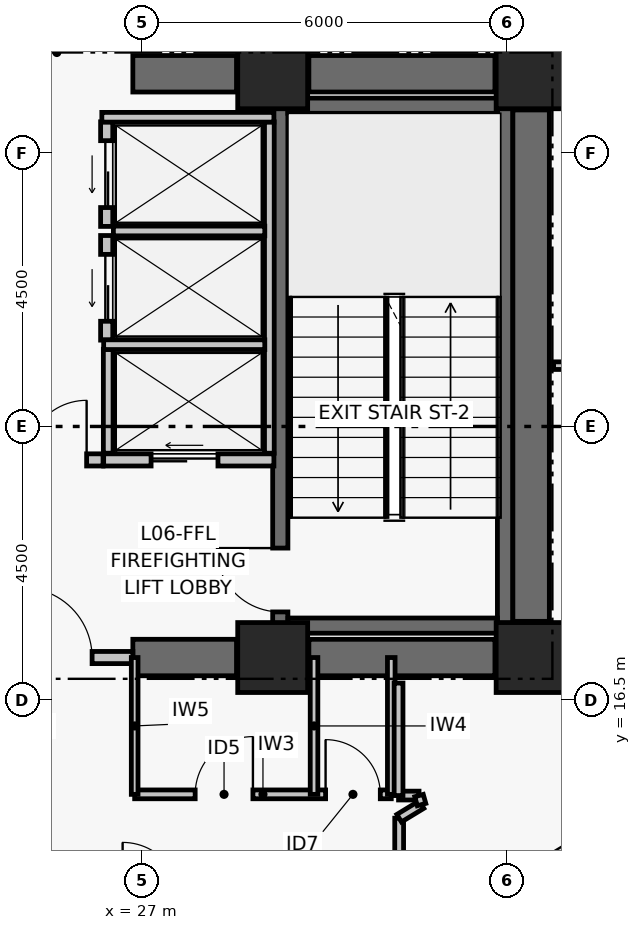
"""IFC4 building model, lengths in metres.
Left out: names, types, materials, properties, quantities, classifications, styles, units other than length and angle.
Written with IfcOpenShell. Run it as: python <this file> out.ifc"""

import sys

from ifc_helpers import new_model, si_unit, direction, frame, frame_2d, origin, origin_2d, place, context, subcontext, project, spatial, rectangle, extrude, element, fill, save


model = new_model("IFC4")
c1 = context("Model", 3, precision=1e-05, world=origin(), true_north=direction((0.0, 1.0)))
c2 = subcontext(c1, "Body", "Model", "MODEL_VIEW")
j1 = project(units=[si_unit("LENGTHUNIT", "METRE"), si_unit("PLANEANGLEUNIT", "RADIAN")], contexts=[c1])
p1 = place(None, origin())
s1 = spatial("IfcSite", under=j1, at=p1, CompositionType="ELEMENT")
p2 = place(p1, origin())
s2 = spatial("IfcBuilding", under=s1, at=p2, CompositionType="ELEMENT")
p3 = place(p2, frame((0.0, 0.0, 31.32)))
s3 = spatial("IfcBuildingStorey", under=s2, at=p3, CompositionType="ELEMENT", Elevation=31.32)
for number, where, z_axis, x_axis in (
    (1, (29.15, 17.2, 0.0), (0.0, 0.0, 1.0), (1.0, 0.0, 0.0)),
    (2, (33.4, 17.2, 0.0), (0.0, 0.0, 1.0), (1.0, 0.0, 0.0)),
    (3, (29.15, 26.8, 0.0), (0.0, 0.0, 1.0), (1.0, 0.0, 0.0)),
    (4, (33.4, 26.8, 0.0), (0.0, 0.0, 1.0), (1.0, 0.0, 0.0)),
):
    element("IfcColumn", number, at=place(p3, frame(where, z_axis=z_axis, x_axis=x_axis)), inside=s3, PredefinedType="COLUMN", context=c2, shape_type="SweptSolid", body=[
        extrude(rectangle(XDim=1.15, YDim=1.15, at=origin_2d()), origin(), (0.0, 0.0, 1.0), 3.72),
    ])
p4 = place(p3, frame((26.85, 17.2, 0.0), z_axis=(0.0, 0.0, 1.0), x_axis=(1.0, 0.0, 0.0)))
e5 = element("IfcWall", 5, at=p4, inside=s3, PredefinedType="SHEAR", context=c2, shape_type="SweptSolid", body=[
    extrude(rectangle(XDim=1.705, YDim=0.6, at=frame_2d((0.853, 0.0))), origin(), (0.0, 0.0, 1.0), 3.47),
])
p5 = place(p3, frame((29.745, 17.2, 0.0), z_axis=(0.0, 0.0, 1.0), x_axis=(1.0, 0.0, 0.0)))
e6 = element("IfcWall", 6, at=p5, inside=s3, PredefinedType="SHEAR", context=c2, shape_type="SweptSolid", body=[
    extrude(rectangle(XDim=3.06, YDim=0.6, at=frame_2d((1.53, 0.0))), origin(), (0.0, 0.0, 1.0), 3.47),
])
p6 = place(p3, frame((26.85, 26.8, 0.0), z_axis=(0.0, 0.0, 1.0), x_axis=(1.0, 0.0, 0.0)))
e7 = element("IfcWall", 7, at=p6, inside=s3, PredefinedType="SHEAR", context=c2, shape_type="SweptSolid", body=[
    extrude(rectangle(XDim=1.705, YDim=0.6, at=frame_2d((0.853, 0.0))), origin(), (0.0, 0.0, 1.0), 3.47),
])
p7 = place(p3, frame((29.745, 26.8, 0.0), z_axis=(0.0, 0.0, 1.0), x_axis=(1.0, 0.0, 0.0)))
e8 = element("IfcWall", 8, at=p7, inside=s3, PredefinedType="SHEAR", context=c2, shape_type="SweptSolid", body=[
    extrude(rectangle(XDim=3.06, YDim=0.6, at=frame_2d((1.53, 0.0))), origin(), (0.0, 0.0, 1.0), 3.47),
])
p8 = place(p3, frame((33.4, 17.795, 0.0), z_axis=(0.0, 0.0, 1.0), x_axis=(0.0, 1.0, 0.0)))
e9 = element("IfcWall", 9, at=p8, inside=s3, PredefinedType="SHEAR", context=c2, shape_type="SweptSolid", body=[
    extrude(rectangle(XDim=8.41, YDim=0.6, at=frame_2d((4.205, 0.0))), origin(), (0.0, 0.0, 1.0), 3.47),
])
p9 = place(p3, frame((29.275, 17.6, 0.0), z_axis=(0.0, 0.0, 1.0), x_axis=(0.0, 1.0, 0.0)))
e10 = element("IfcWall", 10, at=p9, inside=s3, PredefinedType="SHEAR", context=c2, shape_type="SweptSolid", body=[
    extrude(rectangle(XDim=8.8, YDim=0.25, at=frame_2d((4.4, 0.0))), origin(), (0.0, 0.0, 1.0), 3.47),
])
p10 = place(p9, frame((0.35, 0.0, 0.0)))
e11 = element("IfcOpeningElement", 11, at=p10, cuts=e10, PredefinedType="OPENING", context=c2, shape_type="SweptSolid", body=[
    extrude(rectangle(XDim=1.05, YDim=2.08, at=frame_2d((0.525, 1.04))), frame((0.0, 0.135, 0.0), z_axis=(0.0, -1.0, 0.0), x_axis=(1.0, 0.0, 0.0)), (0.0, 0.0, 1.0), 0.27),
])
p11 = place(p3, frame((32.971, 17.6, 0.0), z_axis=(0.0, 0.0, 1.0), x_axis=(0.0, 1.0, 0.0)))
e12 = element("IfcWall", 12, at=p11, inside=s3, PredefinedType="SHEAR", context=c2, shape_type="SweptSolid", body=[
    extrude(rectangle(XDim=8.8, YDim=0.25, at=frame_2d((4.4, 0.0))), origin(), (0.0, 0.0, 1.0), 3.47),
])
for number, where, z_axis, x_axis in (
    (13, (29.4, 17.725, 0.0), (0.0, 0.0, 1.0), (1.0, 0.0, 0.0)),
    (14, (29.4, 26.275, 0.0), (0.0, 0.0, 1.0), (1.0, 0.0, 0.0)),
):
    element("IfcWall", number, at=place(p3, frame(where, z_axis=z_axis, x_axis=x_axis)), inside=s3, PredefinedType="SHEAR", context=c2, shape_type="SweptSolid", body=[
        extrude(rectangle(XDim=3.446, YDim=0.25, at=frame_2d((1.723, 0.0))), origin(), (0.0, 0.0, 1.0), 3.47),
    ])
p12 = place(p3, frame((24.35, 17.2, 0.0), z_axis=(0.0, 0.0, 1.0), x_axis=(1.0, 0.0, 0.0)))
e15 = element("IfcWall", 15, at=p12, inside=s3, PredefinedType="PARTITIONING", context=c2, shape_type="SweptSolid", body=[
    extrude(rectangle(XDim=2.5, YDim=0.2, at=frame_2d((1.25, 0.0))), origin(), (0.0, 0.0, 1.0), 2.6),
])
p13 = place(p12, frame((0.68, 0.0, 0.0)))
e16 = element("IfcOpeningElement", 16, at=p13, cuts=e15, PredefinedType="OPENING", context=c2, shape_type="SweptSolid", body=[
    extrude(rectangle(XDim=1.15, YDim=2.08, at=frame_2d((0.575, 1.04))), frame((0.0, 0.11, 0.0), z_axis=(0.0, -1.0, 0.0), x_axis=(1.0, 0.0, 0.0)), (0.0, 0.0, 1.0), 0.22),
])
p14 = place(p3, frame((24.84, 20.45, 0.0), z_axis=(0.0, 0.0, 1.0), x_axis=(1.0, 0.0, 0.0)))
e17 = element("IfcWall", 17, at=p14, inside=s3, PredefinedType="PARTITIONING", context=c2, shape_type="SweptSolid", body=[
    extrude(rectangle(XDim=1.52, YDim=0.2, at=frame_2d((0.76, 0.0))), origin(), (0.0, 0.0, 1.0), 3.47),
])
p15 = place(p14, frame((0.27, 0.0, 0.0)))
e18 = element("IfcOpeningElement", 18, at=p15, cuts=e17, PredefinedType="OPENING", context=c2, shape_type="SweptSolid", body=[
    extrude(rectangle(XDim=0.98, YDim=2.06, at=frame_2d((0.49, 1.03))), frame((0.0, 0.11, 0.0), z_axis=(0.0, -1.0, 0.0), x_axis=(1.0, 0.0, 0.0)), (0.0, 0.0, 1.0), 0.22),
])
p16 = place(p3, frame((26.37, 20.45, 0.0), z_axis=(0.0, 0.0, 1.0), x_axis=(1.0, 0.0, 0.0)))
e19 = element("IfcWall", 19, at=p16, inside=s3, PredefinedType="PARTITIONING", context=c2, shape_type="SweptSolid", body=[
    extrude(rectangle(XDim=2.8, YDim=0.2, at=frame_2d((1.4, 0.0))), origin(), (0.0, 0.0, 1.0), 3.47),
])
p17 = place(p16, frame((0.78, 0.0, 0.0)))
e20 = element("IfcOpeningElement", 20, at=p17, cuts=e19, PredefinedType="OPENING", context=c2, shape_type="SweptSolid", body=[
    extrude(rectangle(XDim=1.1, YDim=2.08, at=frame_2d((0.55, 1.04))), frame((0.0, 0.11, 0.0), z_axis=(0.0, -1.0, 0.0), x_axis=(1.0, 0.0, 0.0)), (0.0, 0.0, 1.0), 0.22),
])
p18 = place(p3, frame((26.42, 22.42, 0.0), z_axis=(0.0, 0.0, 1.0), x_axis=(0.0, 1.0, 0.0)))
e21 = element("IfcWall", 21, at=p18, inside=s3, PredefinedType="PARTITIONING", context=c2, shape_type="SweptSolid", body=[
    extrude(rectangle(XDim=1.72, YDim=0.2, at=frame_2d((0.86, 0.0))), origin(), (0.0, 0.0, 1.0), 3.47),
])
p19 = place(p18, frame((0.31, 0.0, 0.0)))
e22 = element("IfcOpeningElement", 22, at=p19, cuts=e21, PredefinedType="OPENING", context=c2, shape_type="SweptSolid", body=[
    extrude(rectangle(XDim=1.1, YDim=2.08, at=frame_2d((0.55, 1.04))), frame((0.0, 0.11, 0.0), z_axis=(0.0, -1.0, 0.0), x_axis=(1.0, 0.0, 0.0)), (0.0, 0.0, 1.0), 0.22),
])
p20 = place(p3, frame((26.42, 24.29, 0.0), z_axis=(0.0, 0.0, 1.0), x_axis=(0.0, 1.0, 0.0)))
e23 = element("IfcWall", 23, at=p20, inside=s3, PredefinedType="PARTITIONING", context=c2, shape_type="SweptSolid", body=[
    extrude(rectangle(XDim=1.72, YDim=0.2, at=frame_2d((0.86, 0.0))), origin(), (0.0, 0.0, 1.0), 3.47),
])
p21 = place(p20, frame((0.31, 0.0, 0.0)))
e24 = element("IfcOpeningElement", 24, at=p21, cuts=e23, PredefinedType="OPENING", context=c2, shape_type="SweptSolid", body=[
    extrude(rectangle(XDim=1.1, YDim=2.08, at=frame_2d((0.55, 1.04))), frame((0.0, 0.11, 0.0), z_axis=(0.0, -1.0, 0.0), x_axis=(1.0, 0.0, 0.0)), (0.0, 0.0, 1.0), 0.22),
])
p22 = place(p3, frame((29.095, 20.56, 0.0), z_axis=(0.0, 0.0, 1.0), x_axis=(0.0, 1.0, 0.0)))
e25 = element("IfcWall", 25, at=p22, inside=s3, PredefinedType="PARTITIONING", context=c2, shape_type="SweptSolid", body=[
    extrude(rectangle(XDim=5.45, YDim=0.16, at=frame_2d((2.725, 0.0))), origin(), (0.0, 0.0, 1.0), 3.47),
])
p23 = place(p3, frame((26.445, 20.56, 0.0), z_axis=(0.0, 0.0, 1.0), x_axis=(0.0, 1.0, 0.0)))
e26 = element("IfcWall", 26, at=p23, inside=s3, PredefinedType="PARTITIONING", context=c2, shape_type="SweptSolid", body=[
    extrude(rectangle(XDim=1.71, YDim=0.16, at=frame_2d((0.855, 0.0))), origin(), (0.0, 0.0, 1.0), 3.47),
])
p24 = place(p3, frame((26.37, 22.345, 0.0), z_axis=(0.0, 0.0, 1.0), x_axis=(1.0, 0.0, 0.0)))
e27 = element("IfcWall", 27, at=p24, inside=s3, PredefinedType="PARTITIONING", context=c2, shape_type="SweptSolid", body=[
    extrude(rectangle(XDim=2.65, YDim=0.16, at=frame_2d((1.325, 0.0))), origin(), (0.0, 0.0, 1.0), 3.47),
])
p25 = place(p3, frame((26.53, 24.215, 0.0), z_axis=(0.0, 0.0, 1.0), x_axis=(1.0, 0.0, 0.0)))
e28 = element("IfcWall", 28, at=p25, inside=s3, PredefinedType="PARTITIONING", context=c2, shape_type="SweptSolid", body=[
    extrude(rectangle(XDim=2.49, YDim=0.16, at=frame_2d((1.245, 0.0))), origin(), (0.0, 0.0, 1.0), 3.47),
])
p26 = place(p3, frame((26.34, 26.085, 0.0), z_axis=(0.0, 0.0, 1.0), x_axis=(1.0, 0.0, 0.0)))
e29 = element("IfcWall", 29, at=p26, inside=s3, PredefinedType="PARTITIONING", context=c2, shape_type="SweptSolid", body=[
    extrude(rectangle(XDim=2.83, YDim=0.16, at=frame_2d((1.415, 0.0))), origin(), (0.0, 0.0, 1.0), 3.47),
])
p27 = place(p3, frame((26.88, 14.95, 0.0), z_axis=(0.0, 0.0, 1.0), x_axis=(1.0, 0.0, 0.0)))
e30 = element("IfcWall", 30, at=p27, inside=s3, PredefinedType="PARTITIONING", context=c2, shape_type="SweptSolid", body=[
    extrude(rectangle(XDim=4.22, YDim=0.145, at=frame_2d((2.11, 0.0))), origin(), (0.0, 0.0, 1.0), 3.0),
])
p28 = place(p27, frame((0.995, 0.0, 0.0)))
e31 = element("IfcOpeningElement", 31, at=p28, cuts=e30, PredefinedType="OPENING", context=c2, shape_type="SweptSolid", body=[
    extrude(rectangle(XDim=0.95, YDim=2.06, at=frame_2d((0.475, 1.03))), frame((0.0, 0.083, 0.0), z_axis=(0.0, -1.0, 0.0), x_axis=(1.0, 0.0, 0.0)), (0.0, 0.0, 1.0), 0.165),
])
p29 = place(p27, frame((3.14, 0.0, 0.0)))
e32 = element("IfcOpeningElement", 32, at=p29, cuts=e30, PredefinedType="OPENING", context=c2, shape_type="SweptSolid", body=[
    extrude(rectangle(XDim=0.9, YDim=2.02, at=frame_2d((0.45, 1.01))), frame((0.0, 0.083, 0.0), z_axis=(0.0, -1.0, 0.0), x_axis=(1.0, 0.0, 0.0)), (0.0, 0.0, 1.0), 0.165),
])
p30 = place(p3, frame((26.88, 14.95, 0.0), z_axis=(0.0, 0.0, 1.0), x_axis=(0.0, 1.0, 0.0)))
e33 = element("IfcWall", 33, at=p30, inside=s3, PredefinedType="PARTITIONING", context=c2, shape_type="SweptSolid", body=[
    extrude(rectangle(XDim=2.25, YDim=0.11, at=frame_2d((1.125, 0.0))), origin(), (0.0, 0.0, 1.0), 2.6),
])
for number, where, z_axis, x_axis in (
    (34, (29.83, 14.95, 0.0), (0.0, 0.0, 1.0), (0.0, 1.0, 0.0)),
    (35, (31.1, 14.95, 0.0), (0.0, 0.0, 1.0), (0.0, 1.0, 0.0)),
):
    element("IfcWall", number, at=place(p3, frame(where, z_axis=z_axis, x_axis=x_axis)), inside=s3, PredefinedType="PARTITIONING", context=c2, shape_type="SweptSolid", body=[
        extrude(rectangle(XDim=2.25, YDim=0.125, at=frame_2d((1.125, 0.0))), origin(), (0.0, 0.0, 1.0), 2.6),
    ])
p31 = place(p3, frame((31.23, 13.29, 0.0), z_axis=(0.0, 0.0, 1.0), x_axis=(0.0, 1.0, 0.0)))
e36 = element("IfcWall", 36, at=p31, inside=s3, PredefinedType="PARTITIONING", context=c2, shape_type="SweptSolid", body=[
    extrude(rectangle(XDim=1.268, YDim=0.145, at=frame_2d((0.634, 0.0))), origin(), (0.0, 0.0, 1.0), 2.85),
])
p32 = place(p3, frame((31.23, 14.558, 0.0), z_axis=(0.0, 0.0, 1.0), x_axis=(0.854931196424, 0.518741408971, 0.0)))
e37 = element("IfcWall", 37, at=p32, inside=s3, PredefinedType="PARTITIONING", context=c2, shape_type="SweptSolid", body=[
    extrude(rectangle(XDim=0.431, YDim=0.145, at=frame_2d((0.215, 0.0))), origin(), (0.0, 0.0, 1.0), 3.0),
])
p33 = place(p3, frame((31.557, 14.93, 0.0), z_axis=(0.0, 0.0, 1.0), x_axis=(-1.0, 0.0, 0.0)))
e38 = element("IfcWall", 38, at=p33, inside=s3, PredefinedType="PARTITIONING", context=c2, shape_type="SweptSolid", body=[
    extrude(rectangle(XDim=0.337, YDim=0.145, at=frame_2d((0.168, 0.0))), origin(), (0.0, 0.0, 1.0), 3.0),
])
p34 = place(p3, frame((31.22, 14.93, 0.0), z_axis=(0.0, 0.0, 1.0), x_axis=(0.0, 1.0, 0.0)))
e39 = element("IfcWall", 39, at=p34, inside=s3, PredefinedType="PARTITIONING", context=c2, shape_type="SweptSolid", body=[
    extrude(rectangle(XDim=1.85, YDim=0.145, at=frame_2d((0.925, 0.0))), origin(), (0.0, 0.0, 1.0), 2.6),
])
p35 = place(p3, frame((33.74, 27.22, 0.0), z_axis=(0.0, 0.0, 1.0), x_axis=(-1.0, 0.0, 0.0)))
e40 = element("IfcWall", 40, at=p35, inside=s3, PredefinedType="PARTITIONING", context=c2, shape_type="SweptSolid", body=[
    extrude(rectangle(XDim=0.86, YDim=0.145, at=frame_2d((0.43, 0.0))), origin(), (0.0, 0.0, 1.0), 2.6),
])
p36 = place(p3, frame((33.77, 22.0, 0.0), z_axis=(0.0, 0.0, 1.0), x_axis=(1.0, 0.0, 0.0)))
e41 = element("IfcWall", 41, at=p36, inside=s3, PredefinedType="PARTITIONING", context=c2, shape_type="SweptSolid", body=[
    extrude(rectangle(XDim=9.755, YDim=0.125, at=frame_2d((4.877, 0.0))), origin(), (0.0, 0.0, 1.0), 2.6),
])
p37 = place(p3, frame((31.598, 14.781, 0.0), z_axis=(0.0, 0.0, 1.0), x_axis=(-0.269277388617, 0.963062660464, 0.0)))
e42 = element("IfcWall", 42, at=p37, inside=s3, PredefinedType="PARTITIONING", context=c2, shape_type="SweptSolid", body=[
    extrude(rectangle(XDim=0.154, YDim=0.145, at=frame_2d((0.077, 0.0))), origin(), (0.0, 0.0, 1.0), 3.0),
])
p38 = place(p10, origin())
e43 = element("IfcDoor", 43, at=p38, inside=s3, OperationType="SINGLE_SWING_RIGHT", PredefinedType="DOOR", context=c2, shape_type="SweptSolid", body=[
    extrude(rectangle(XDim=1.05, YDim=2.08, at=frame_2d((0.525, 1.04))), frame((0.0, 0.025, 0.0), z_axis=(0.0, -1.0, 0.0), x_axis=(1.0, 0.0, 0.0)), (0.0, 0.0, 1.0), 0.05),
])
fill(e11, e43)
p39 = place(p13, origin())
e44 = element("IfcDoor", 44, at=p39, inside=s3, OperationType="SINGLE_SWING_LEFT", PredefinedType="DOOR", context=c2, shape_type="SweptSolid", body=[
    extrude(rectangle(XDim=1.15, YDim=2.08, at=frame_2d((0.575, 1.04))), frame((0.0, 0.025, 0.0), z_axis=(0.0, -1.0, 0.0), x_axis=(1.0, 0.0, 0.0)), (0.0, 0.0, 1.0), 0.05),
])
fill(e16, e44)
p40 = place(p15, origin())
e45 = element("IfcDoor", 45, at=p40, inside=s3, OperationType="SINGLE_SWING_RIGHT", PredefinedType="DOOR", context=c2, shape_type="SweptSolid", body=[
    extrude(rectangle(XDim=0.98, YDim=2.06, at=frame_2d((0.49, 1.03))), frame((0.0, 0.025, 0.0), z_axis=(0.0, -1.0, 0.0), x_axis=(1.0, 0.0, 0.0)), (0.0, 0.0, 1.0), 0.05),
])
fill(e18, e45)
p41 = place(p17, origin())
e46 = element("IfcDoor", 46, at=p41, inside=s3, OperationType="DOUBLE_DOOR_SLIDING", PredefinedType="DOOR", context=c2, shape_type="SweptSolid", body=[
    extrude(rectangle(XDim=1.1, YDim=2.08, at=frame_2d((0.55, 1.04))), frame((0.0, 0.025, 0.0), z_axis=(0.0, -1.0, 0.0), x_axis=(1.0, 0.0, 0.0)), (0.0, 0.0, 1.0), 0.05),
])
fill(e20, e46)
p42 = place(p19, origin())
e47 = element("IfcDoor", 47, at=p42, inside=s3, OperationType="DOUBLE_DOOR_SLIDING", PredefinedType="DOOR", context=c2, shape_type="SweptSolid", body=[
    extrude(rectangle(XDim=1.1, YDim=2.08, at=frame_2d((0.55, 1.04))), frame((0.0, 0.025, 0.0), z_axis=(0.0, -1.0, 0.0), x_axis=(1.0, 0.0, 0.0)), (0.0, 0.0, 1.0), 0.05),
])
fill(e22, e47)
p43 = place(p21, origin())
e48 = element("IfcDoor", 48, at=p43, inside=s3, OperationType="DOUBLE_DOOR_SLIDING", PredefinedType="DOOR", context=c2, shape_type="SweptSolid", body=[
    extrude(rectangle(XDim=1.1, YDim=2.08, at=frame_2d((0.55, 1.04))), frame((0.0, 0.025, 0.0), z_axis=(0.0, -1.0, 0.0), x_axis=(1.0, 0.0, 0.0)), (0.0, 0.0, 1.0), 0.05),
])
fill(e24, e48)
p44 = place(p28, origin())
e49 = element("IfcDoor", 49, at=p44, inside=s3, OperationType="SINGLE_SWING_RIGHT", PredefinedType="DOOR", context=c2, shape_type="SweptSolid", body=[
    extrude(rectangle(XDim=0.95, YDim=2.06, at=frame_2d((0.475, 1.03))), frame((0.0, 0.025, 0.0), z_axis=(0.0, -1.0, 0.0), x_axis=(1.0, 0.0, 0.0)), (0.0, 0.0, 1.0), 0.05),
])
fill(e31, e49)
p45 = place(p29, origin())
e50 = element("IfcDoor", 50, at=p45, inside=s3, OperationType="SINGLE_SWING_LEFT", PredefinedType="DOOR", context=c2, shape_type="SweptSolid", body=[
    extrude(rectangle(XDim=0.9, YDim=2.02, at=frame_2d((0.45, 1.01))), frame((0.0, 0.025, 0.0), z_axis=(0.0, -1.0, 0.0), x_axis=(1.0, 0.0, 0.0)), (0.0, 0.0, 1.0), 0.05),
])
fill(e32, e50)
save(model, sys.argv[1])
